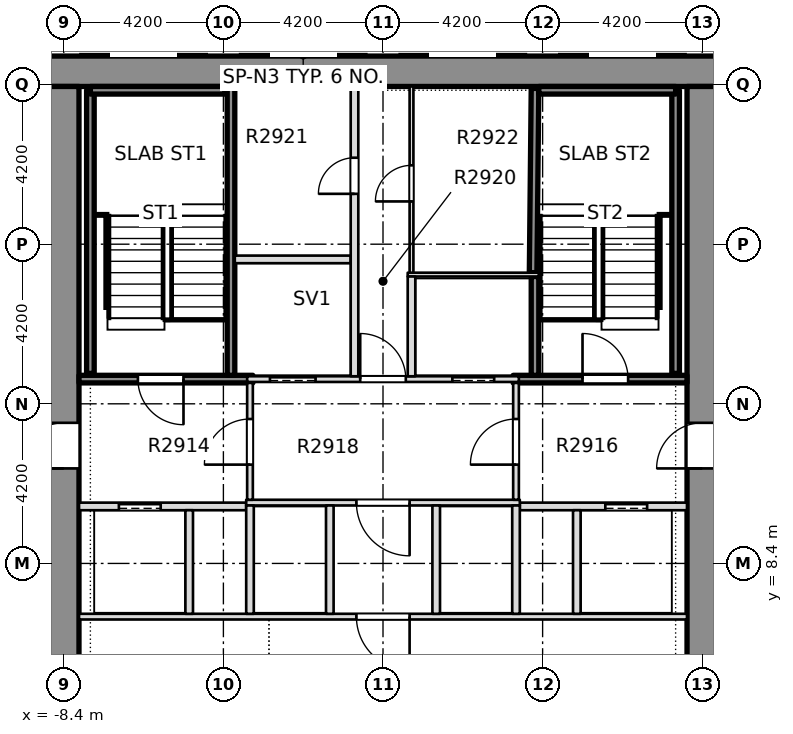
"""IFC4 building model, lengths in metres.
Left out: names, types, materials, properties, quantities, classifications, styles, units other than length and angle.
Written with IfcOpenShell. Run it as: python <this file> out.ifc"""

import sys

from ifc_helpers import new_model, si_unit, direction, frame, frame_2d, origin, place, context, subcontext, project, spatial, rectangle, extrude, element, fill, save


model = new_model("IFC4")
c1 = context("Model", 3, precision=1e-05, world=origin(), true_north=direction((0.0, 1.0)))
c2 = subcontext(c1, "Body", "Model", "MODEL_VIEW")
j1 = project(units=[si_unit("LENGTHUNIT", "METRE"), si_unit("PLANEANGLEUNIT", "RADIAN")], contexts=[c1])
p1 = place(None, origin())
s1 = spatial("IfcSite", under=j1, at=p1, CompositionType="ELEMENT")
p2 = place(p1, origin())
s2 = spatial("IfcBuilding", under=s1, at=p2, CompositionType="ELEMENT")
p3 = place(p2, frame((0.0, 0.0, 114.9)))
s3 = spatial("IfcBuildingStorey", under=s2, at=p3, CompositionType="ELEMENT", Elevation=114.9)
p4 = place(p3, frame((-11.8, 21.35, -0.32), z_axis=(0.0, 0.0, 1.0), x_axis=(1.0, 0.0, 0.0)))
e1 = element("IfcWall", 1, at=p4, inside=s3, PredefinedType="SHEAR", context=c2, shape_type="SweptSolid", body=[
    extrude(rectangle(XDim=23.6, YDim=0.8, at=frame_2d((11.8, 0.0))), origin(), (0.0, 0.0, 1.0), 3.45),
])
p5 = place(p3, frame((-8.4, -7.6, -0.32), z_axis=(0.0, 0.0, 1.0), x_axis=(0.0, 1.0, 0.0)))
e2 = element("IfcWall", 2, at=p5, inside=s3, PredefinedType="SHEAR", context=c2, shape_type="SweptSolid", body=[
    extrude(rectangle(XDim=28.55, YDim=0.8, at=frame_2d((14.275, 0.0))), origin(), (0.0, 0.0, 1.0), 3.45),
])
p6 = place(p5, frame((18.5, 0.0, 0.32)))
e3 = element("IfcOpeningElement", 3, at=p6, cuts=e2, PredefinedType="OPENING", context=c2, shape_type="SweptSolid", body=[
    extrude(rectangle(XDim=1.2, YDim=2.1, at=frame_2d((0.6, 1.05))), frame((0.0, 0.41, 0.0), z_axis=(0.0, -1.0, 0.0), x_axis=(1.0, 0.0, 0.0)), (0.0, 0.0, 1.0), 0.82),
])
p7 = place(p3, frame((8.4, -7.6, -0.32), z_axis=(0.0, 0.0, 1.0), x_axis=(0.0, 1.0, 0.0)))
e4 = element("IfcWall", 4, at=p7, inside=s3, PredefinedType="SHEAR", context=c2, shape_type="SweptSolid", body=[
    extrude(rectangle(XDim=28.55, YDim=0.8, at=frame_2d((14.275, 0.0))), origin(), (0.0, 0.0, 1.0), 3.45),
])
p8 = place(p7, frame((18.5, 0.0, 0.32)))
e5 = element("IfcOpeningElement", 5, at=p8, cuts=e4, PredefinedType="OPENING", context=c2, shape_type="SweptSolid", body=[
    extrude(rectangle(XDim=1.2, YDim=2.1, at=frame_2d((0.6, 1.05))), frame((0.0, 0.41, 0.0), z_axis=(0.0, -1.0, 0.0), x_axis=(1.0, 0.0, 0.0)), (0.0, 0.0, 1.0), 0.82),
])
p9 = place(p3, frame((-7.999, 7.0, 0.0), z_axis=(0.0, 0.0, 1.0), x_axis=(1.0, 0.0, 0.0)))
e6 = element("IfcWall", 6, at=p9, inside=s3, PredefinedType="PARTITIONING", context=c2, shape_type="SweptSolid", body=[
    extrude(rectangle(XDim=15.998, YDim=0.15, at=frame_2d((7.999, 0.0))), origin(), (0.0, 0.0, 1.0), 3.13),
])
p10 = place(p9, frame((7.299, 0.0, 0.0)))
e7 = element("IfcOpeningElement", 7, at=p10, cuts=e6, PredefinedType="OPENING", context=c2, shape_type="SweptSolid", body=[
    extrude(rectangle(XDim=1.4, YDim=2.1, at=frame_2d((0.7, 1.05))), frame((0.0, 0.085, 0.0), z_axis=(0.0, -1.0, 0.0), x_axis=(1.0, 0.0, 0.0)), (0.0, 0.0, 1.0), 0.17),
])
p11 = place(p3, frame((-7.999, 9.9, 0.0), z_axis=(0.0, 0.0, 1.0), x_axis=(1.0, 0.0, 0.0)))
e8 = element("IfcWall", 8, at=p11, inside=s3, PredefinedType="PARTITIONING", context=c2, shape_type="SweptSolid", body=[
    extrude(rectangle(XDim=4.399, YDim=0.2, at=frame_2d((2.199, 0.0))), origin(), (0.0, 0.0, 1.0), 3.13),
])
p12 = place(p11, frame((1.049, 0.0, 0.0)))
e9 = element("IfcOpeningElement", 9, at=p12, cuts=e8, PredefinedType="OPENING", context=c2, shape_type="SweptSolid", body=[
    extrude(rectangle(XDim=1.1, YDim=2.1, at=frame_2d((0.55, 1.05))), frame((0.0, 0.11, 0.0), z_axis=(0.0, -1.0, 0.0), x_axis=(1.0, 0.0, 0.0)), (0.0, 0.0, 1.0), 0.22),
])
p13 = place(p3, frame((3.6, 9.9, 0.0), z_axis=(0.0, 0.0, 1.0), x_axis=(1.0, 0.0, 0.0)))
e10 = element("IfcWall", 10, at=p13, inside=s3, PredefinedType="PARTITIONING", context=c2, shape_type="SweptSolid", body=[
    extrude(rectangle(XDim=4.399, YDim=0.2, at=frame_2d((2.199, 0.0))), origin(), (0.0, 0.0, 1.0), 3.13),
])
p14 = place(p13, frame((2.25, 0.0, 0.0)))
e11 = element("IfcOpeningElement", 11, at=p14, cuts=e10, PredefinedType="OPENING", context=c2, shape_type="SweptSolid", body=[
    extrude(rectangle(XDim=1.1, YDim=2.1, at=frame_2d((0.55, 1.05))), frame((0.0, 0.11, 0.0), z_axis=(0.0, -1.0, 0.0), x_axis=(1.0, 0.0, 0.0)), (0.0, 0.0, 1.0), 0.22),
])
p15 = place(p3, frame((-3.6, 10.0, 0.0), z_axis=(0.0, 0.0, 1.0), x_axis=(1.0, 0.0, 0.0)))
e12 = element("IfcWall", 12, at=p15, inside=s3, PredefinedType="PARTITIONING", context=c2, shape_type="SweptSolid", body=[
    extrude(rectangle(XDim=7.2, YDim=0.15, at=frame_2d((3.6, 0.0))), origin(), (0.0, 0.0, 1.0), 3.13),
])
p16 = place(p15, frame((2.9, 0.0, 0.0)))
e13 = element("IfcOpeningElement", 13, at=p16, cuts=e12, PredefinedType="OPENING", context=c2, shape_type="SweptSolid", body=[
    extrude(rectangle(XDim=1.4, YDim=2.1, at=frame_2d((0.7, 1.05))), frame((0.0, 0.085, 0.0), z_axis=(0.0, -1.0, 0.0), x_axis=(1.0, 0.0, 0.0)), (0.0, 0.0, 1.0), 0.17),
])
p17 = place(p3, frame((-7.999, 13.25, 0.0), z_axis=(0.0, 0.0, 1.0), x_axis=(1.0, 0.0, 0.0)))
e14 = element("IfcWall", 14, at=p17, inside=s3, PredefinedType="SOLIDWALL", context=c2, shape_type="SweptSolid", body=[
    extrude(rectangle(XDim=4.574, YDim=0.2, at=frame_2d((2.287, 0.0))), origin(), (0.0, 0.0, 1.0), 3.13),
])
p18 = place(p17, frame((1.549, 0.0, 0.0)))
e15 = element("IfcOpeningElement", 15, at=p18, cuts=e14, PredefinedType="OPENING", context=c2, shape_type="SweptSolid", body=[
    extrude(rectangle(XDim=1.2, YDim=2.1, at=frame_2d((0.6, 1.05))), frame((0.0, 0.11, 0.0), z_axis=(0.0, -1.0, 0.0), x_axis=(1.0, 0.0, 0.0)), (0.0, 0.0, 1.0), 0.22),
])
p19 = place(p3, frame((-3.575, 13.25, 0.0), z_axis=(0.0, 0.0, 1.0), x_axis=(1.0, 0.0, 0.0)))
e16 = element("IfcWall", 16, at=p19, inside=s3, PredefinedType="PARTITIONING", context=c2, shape_type="SweptSolid", body=[
    extrude(rectangle(XDim=7.15, YDim=0.15, at=frame_2d((3.575, 0.0))), origin(), (0.0, 0.0, 1.0), 3.13),
])
p20 = place(p19, frame((0.6, 0.0, 0.0)))
e17 = element("IfcOpeningElement", 17, at=p20, cuts=e16, PredefinedType="OPENING", context=c2, shape_type="SweptSolid", body=[
    extrude(rectangle(XDim=1.2, YDim=2.1, at=frame_2d((0.6, 1.05))), frame((0.0, 0.085, 0.0), z_axis=(0.0, -1.0, 0.0), x_axis=(1.0, 0.0, 0.0)), (0.0, 0.0, 1.0), 0.17),
])
p21 = place(p19, frame((5.4, 0.0, 0.0)))
e18 = element("IfcOpeningElement", 18, at=p21, cuts=e16, PredefinedType="OPENING", context=c2, shape_type="SweptSolid", body=[
    extrude(rectangle(XDim=1.1, YDim=2.1, at=frame_2d((0.55, 1.05))), frame((0.0, 0.085, 0.0), z_axis=(0.0, -1.0, 0.0), x_axis=(1.0, 0.0, 0.0)), (0.0, 0.0, 1.0), 0.17),
])
p22 = place(p19, frame((2.975, 0.0, 0.0)))
e19 = element("IfcOpeningElement", 19, at=p22, cuts=e16, PredefinedType="OPENING", context=c2, shape_type="SweptSolid", body=[
    extrude(rectangle(XDim=1.2, YDim=2.1, at=frame_2d((0.6, 1.05))), frame((0.0, 0.085, 0.0), z_axis=(0.0, -1.0, 0.0), x_axis=(1.0, 0.0, 0.0)), (0.0, 0.0, 1.0), 0.17),
])
p23 = place(p3, frame((3.425, 13.25, 0.0), z_axis=(0.0, 0.0, 1.0), x_axis=(1.0, 0.0, 0.0)))
e20 = element("IfcWall", 20, at=p23, inside=s3, PredefinedType="SOLIDWALL", context=c2, shape_type="SweptSolid", body=[
    extrude(rectangle(XDim=4.574, YDim=0.2, at=frame_2d((2.287, 0.0))), origin(), (0.0, 0.0, 1.0), 3.13),
])
p24 = place(p23, frame((1.825, 0.0, 0.0)))
e21 = element("IfcOpeningElement", 21, at=p24, cuts=e20, PredefinedType="OPENING", context=c2, shape_type="SweptSolid", body=[
    extrude(rectangle(XDim=1.2, YDim=2.1, at=frame_2d((0.6, 1.05))), frame((0.0, 0.11, 0.0), z_axis=(0.0, -1.0, 0.0), x_axis=(1.0, 0.0, 0.0)), (0.0, 0.0, 1.0), 0.22),
])
p25 = place(p3, frame((0.65, 16.0, 0.0), z_axis=(0.0, 0.0, 1.0), x_axis=(1.0, 0.0, 0.0)))
e22 = element("IfcWall", 22, at=p25, inside=s3, PredefinedType="PARTITIONING", context=c2, shape_type="SweptSolid", body=[
    extrude(rectangle(XDim=3.45, YDim=0.1, at=frame_2d((1.725, 0.0))), origin(), (0.0, 0.0, 1.0), 3.13),
])
p26 = place(p3, frame((-3.9, 16.4, 0.0), z_axis=(0.0, 0.0, 1.0), x_axis=(1.0, 0.0, 0.0)))
e23 = element("IfcWall", 23, at=p26, inside=s3, PredefinedType="PARTITIONING", context=c2, shape_type="SweptSolid", body=[
    extrude(rectangle(XDim=3.05, YDim=0.2, at=frame_2d((1.525, 0.0))), origin(), (0.0, 0.0, 1.0), 3.13),
])
p27 = place(p3, frame((-5.1, 7.075, 0.0), z_axis=(0.0, 0.0, 1.0), x_axis=(0.0, 1.0, 0.0)))
e24 = element("IfcWall", 24, at=p27, inside=s3, PredefinedType="PARTITIONING", context=c2, shape_type="SweptSolid", body=[
    extrude(rectangle(XDim=2.725, YDim=0.2, at=frame_2d((1.363, 0.0))), origin(), (0.0, 0.0, 1.0), 3.13),
])
p28 = place(p3, frame((-4.0, 13.35, 0.0), z_axis=(0.0, 0.0, 1.0), x_axis=(0.0, 1.0, 0.0)))
e25 = element("IfcWall", 25, at=p28, inside=s3, PredefinedType="SOLIDWALL", context=c2, shape_type="SweptSolid", body=[
    extrude(rectangle(XDim=7.599, YDim=0.2, at=frame_2d((3.799, 0.0))), origin(), (0.0, 0.0, 1.0), 3.13),
])
p29 = place(p3, frame((-3.5, 7.075, 0.0), z_axis=(0.0, 0.0, 1.0), x_axis=(0.0, 1.0, 0.0)))
e26 = element("IfcWall", 26, at=p29, inside=s3, PredefinedType="PARTITIONING", context=c2, shape_type="SweptSolid", body=[
    extrude(rectangle(XDim=2.85, YDim=0.2, at=frame_2d((1.425, 0.0))), origin(), (0.0, 0.0, 1.0), 3.13),
])
p30 = place(p3, frame((-3.5, 10.075, 0.0), z_axis=(0.0, 0.0, 1.0), x_axis=(0.0, 1.0, 0.0)))
e27 = element("IfcWall", 27, at=p30, inside=s3, PredefinedType="PARTITIONING", context=c2, shape_type="SweptSolid", body=[
    extrude(rectangle(XDim=3.075, YDim=0.15, at=frame_2d((1.538, 0.0))), origin(), (0.0, 0.0, 1.0), 3.13),
])
p31 = place(p30, frame((0.925, 0.0, 0.0)))
e28 = element("IfcOpeningElement", 28, at=p31, cuts=e27, PredefinedType="OPENING", context=c2, shape_type="SweptSolid", body=[
    extrude(rectangle(XDim=1.2, YDim=2.1, at=frame_2d((0.6, 1.05))), frame((0.0, 0.085, 0.0), z_axis=(0.0, -1.0, 0.0), x_axis=(1.0, 0.0, 0.0)), (0.0, 0.0, 1.0), 0.17),
])
p32 = place(p3, frame((-1.4, 7.075, 0.0), z_axis=(0.0, 0.0, 1.0), x_axis=(0.0, 1.0, 0.0)))
e29 = element("IfcWall", 29, at=p32, inside=s3, PredefinedType="PARTITIONING", context=c2, shape_type="SweptSolid", body=[
    extrude(rectangle(XDim=2.85, YDim=0.2, at=frame_2d((1.425, 0.0))), origin(), (0.0, 0.0, 1.0), 3.13),
])
p33 = place(p3, frame((-0.75, 13.325, 0.0), z_axis=(0.0, 0.0, 1.0), x_axis=(0.0, 1.0, 0.0)))
e30 = element("IfcWall", 30, at=p33, inside=s3, PredefinedType="PARTITIONING", context=c2, shape_type="SweptSolid", body=[
    extrude(rectangle(XDim=7.624, YDim=0.2, at=frame_2d((3.812, 0.0))), origin(), (0.0, 0.0, 1.0), 3.13),
])
p34 = place(p33, frame((4.8, 0.0, 0.0)))
e31 = element("IfcOpeningElement", 31, at=p34, cuts=e30, PredefinedType="OPENING", context=c2, shape_type="SweptSolid", body=[
    extrude(rectangle(XDim=0.95, YDim=2.1, at=frame_2d((0.475, 1.05))), frame((0.0, 0.11, 0.0), z_axis=(0.0, -1.0, 0.0), x_axis=(1.0, 0.0, 0.0)), (0.0, 0.0, 1.0), 0.22),
])
p35 = place(p3, frame((0.75, 13.325, 0.0), z_axis=(0.0, 0.0, 1.0), x_axis=(0.0, 1.0, 0.0)))
e32 = element("IfcWall", 32, at=p35, inside=s3, PredefinedType="PARTITIONING", context=c2, shape_type="SweptSolid", body=[
    extrude(rectangle(XDim=2.625, YDim=0.2, at=frame_2d((1.312, 0.0))), origin(), (0.0, 0.0, 1.0), 3.13),
])
p36 = place(p3, frame((0.75, 16.05, 0.0), z_axis=(0.0, 0.0, 1.0), x_axis=(0.0, 1.0, 0.0)))
e33 = element("IfcWall", 33, at=p36, inside=s3, PredefinedType="PARTITIONING", context=c2, shape_type="SweptSolid", body=[
    extrude(rectangle(XDim=4.899, YDim=0.1, at=frame_2d((2.449, 0.0))), origin(), (0.0, 0.0, 1.0), 3.13),
])
p37 = place(p36, frame((1.875, 0.0, 0.0)))
e34 = element("IfcOpeningElement", 34, at=p37, cuts=e33, PredefinedType="OPENING", context=c2, shape_type="SweptSolid", body=[
    extrude(rectangle(XDim=0.95, YDim=2.1, at=frame_2d((0.475, 1.05))), frame((0.0, 0.06, 0.0), z_axis=(0.0, -1.0, 0.0), x_axis=(1.0, 0.0, 0.0)), (0.0, 0.0, 1.0), 0.12),
])
for number, where, z_axis, x_axis in (
    (35, (1.4, 7.075, 0.0), (0.0, 0.0, 1.0), (0.0, 1.0, 0.0)),
    (36, (3.5, 7.075, 0.0), (0.0, 0.0, 1.0), (0.0, 1.0, 0.0)),
):
    element("IfcWall", number, at=place(p3, frame(where, z_axis=z_axis, x_axis=x_axis)), inside=s3, PredefinedType="PARTITIONING", context=c2, shape_type="SweptSolid", body=[
        extrude(rectangle(XDim=2.85, YDim=0.2, at=frame_2d((1.425, 0.0))), origin(), (0.0, 0.0, 1.0), 3.13),
    ])
p38 = place(p3, frame((3.5, 10.075, 0.0), z_axis=(0.0, 0.0, 1.0), x_axis=(0.0, 1.0, 0.0)))
e37 = element("IfcWall", 37, at=p38, inside=s3, PredefinedType="PARTITIONING", context=c2, shape_type="SweptSolid", body=[
    extrude(rectangle(XDim=3.075, YDim=0.15, at=frame_2d((1.538, 0.0))), origin(), (0.0, 0.0, 1.0), 3.13),
])
p39 = place(p38, frame((0.925, 0.0, 0.0)))
e38 = element("IfcOpeningElement", 38, at=p39, cuts=e37, PredefinedType="OPENING", context=c2, shape_type="SweptSolid", body=[
    extrude(rectangle(XDim=1.2, YDim=2.1, at=frame_2d((0.6, 1.05))), frame((0.0, 0.085, 0.0), z_axis=(0.0, -1.0, 0.0), x_axis=(1.0, 0.0, 0.0)), (0.0, 0.0, 1.0), 0.17),
])
p40 = place(p3, frame((4.0, 13.35, 0.0), z_axis=(0.0, 0.0, 1.0), x_axis=(0.0, 1.0, 0.0)))
e39 = element("IfcWall", 39, at=p40, inside=s3, PredefinedType="SOLIDWALL", context=c2, shape_type="SweptSolid", body=[
    extrude(rectangle(XDim=2.6, YDim=0.2, at=frame_2d((1.3, 0.0))), origin(), (0.0, 0.0, 1.0), 3.13),
])
p41 = place(p3, frame((3.95, 16.05, 0.0), z_axis=(0.0, 0.0, 1.0), x_axis=(0.01032118628, 0.999946735138, 0.0)))
e40 = element("IfcWall", 40, at=p41, inside=s3, PredefinedType="SOLIDWALL", context=c2, shape_type="SweptSolid", body=[
    extrude(rectangle(XDim=4.849, YDim=0.2, at=frame_2d((2.425, 0.0))), origin(), (0.0, 0.0, 1.0), 3.13),
])
p42 = place(p3, frame((5.1, 7.075, 0.0), z_axis=(0.0, 0.0, 1.0), x_axis=(0.0, 1.0, 0.0)))
e41 = element("IfcWall", 41, at=p42, inside=s3, PredefinedType="PARTITIONING", context=c2, shape_type="SweptSolid", body=[
    extrude(rectangle(XDim=2.725, YDim=0.2, at=frame_2d((1.363, 0.0))), origin(), (0.0, 0.0, 1.0), 3.13),
])
p43 = place(p3, frame((-7.7, 13.4, 0.0), z_axis=(0.0, 0.0, 1.0), x_axis=(0.0, 1.0, 0.0)))
e42 = element("IfcWall", 42, at=p43, inside=s3, PredefinedType="SOLIDWALL", context=c2, shape_type="SweptSolid", body=[
    extrude(rectangle(XDim=7.45, YDim=0.2, at=frame_2d((3.725, 0.0))), origin(), (0.0, 0.0, 1.0), 3.13),
])
p44 = place(p3, frame((-7.7, 20.85, 0.0), z_axis=(0.0, 0.0, 1.0), x_axis=(1.0, 0.0, 0.0)))
e43 = element("IfcWall", 43, at=p44, inside=s3, PredefinedType="SOLIDWALL", context=c2, shape_type="SweptSolid", body=[
    extrude(rectangle(XDim=3.55, YDim=0.2, at=frame_2d((1.775, 0.0))), origin(), (0.0, 0.0, 1.0), 3.13),
])
p45 = place(p3, frame((7.7, 13.4, 0.0), z_axis=(0.0, 0.0, 1.0), x_axis=(0.0, 1.0, 0.0)))
e44 = element("IfcWall", 44, at=p45, inside=s3, PredefinedType="SOLIDWALL", context=c2, shape_type="SweptSolid", body=[
    extrude(rectangle(XDim=7.45, YDim=0.2, at=frame_2d((3.725, 0.0))), origin(), (0.0, 0.0, 1.0), 3.13),
])
p46 = place(p3, frame((4.1, 20.85, 0.0), z_axis=(0.0, 0.0, 1.0), x_axis=(1.0, 0.0, 0.0)))
e45 = element("IfcWall", 45, at=p46, inside=s3, PredefinedType="SOLIDWALL", context=c2, shape_type="SweptSolid", body=[
    extrude(rectangle(XDim=3.6, YDim=0.2, at=frame_2d((1.8, 0.0))), origin(), (0.0, 0.0, 1.0), 3.13),
])
p47 = place(p18, origin())
e46 = element("IfcDoor", 46, at=p47, inside=s3, OperationType="SINGLE_SWING_LEFT", PredefinedType="DOOR", context=c2, shape_type="SweptSolid", body=[
    extrude(rectangle(XDim=1.2, YDim=2.1, at=frame_2d((0.6, 1.05))), frame((0.0, 0.025, 0.0), z_axis=(0.0, -1.0, 0.0), x_axis=(1.0, 0.0, 0.0)), (0.0, 0.0, 1.0), 0.05),
])
fill(e15, e46)
p48 = place(p12, origin())
e47 = element("IfcDoor", 47, at=p48, inside=s3, OperationType="SLIDING_TO_LEFT", PredefinedType="DOOR", context=c2, shape_type="SweptSolid", body=[
    extrude(rectangle(XDim=1.1, YDim=2.1, at=frame_2d((0.55, 1.05))), frame((0.0, 0.025, 0.0), z_axis=(0.0, -1.0, 0.0), x_axis=(1.0, 0.0, 0.0)), (0.0, 0.0, 1.0), 0.05),
])
fill(e9, e47)
p49 = place(p24, origin())
e48 = element("IfcDoor", 48, at=p49, inside=s3, OperationType="SINGLE_SWING_RIGHT", PredefinedType="DOOR", context=c2, shape_type="SweptSolid", body=[
    extrude(rectangle(XDim=1.2, YDim=2.1, at=frame_2d((0.6, 1.05))), frame((0.0, 0.025, 0.0), z_axis=(0.0, -1.0, 0.0), x_axis=(1.0, 0.0, 0.0)), (0.0, 0.0, 1.0), 0.05),
])
fill(e21, e48)
p50 = place(p14, origin())
e49 = element("IfcDoor", 49, at=p50, inside=s3, OperationType="SLIDING_TO_LEFT", PredefinedType="DOOR", context=c2, shape_type="SweptSolid", body=[
    extrude(rectangle(XDim=1.1, YDim=2.1, at=frame_2d((0.55, 1.05))), frame((0.0, 0.025, 0.0), z_axis=(0.0, -1.0, 0.0), x_axis=(1.0, 0.0, 0.0)), (0.0, 0.0, 1.0), 0.05),
])
fill(e11, e49)
p51 = place(p10, origin())
e50 = element("IfcDoor", 50, at=p51, inside=s3, OperationType="SINGLE_SWING_RIGHT", PredefinedType="DOOR", context=c2, shape_type="SweptSolid", body=[
    extrude(rectangle(XDim=1.4, YDim=2.1, at=frame_2d((0.7, 1.05))), frame((0.0, 0.025, 0.0), z_axis=(0.0, -1.0, 0.0), x_axis=(1.0, 0.0, 0.0)), (0.0, 0.0, 1.0), 0.05),
])
fill(e7, e50)
p52 = place(p16, origin())
e51 = element("IfcDoor", 51, at=p52, inside=s3, OperationType="SINGLE_SWING_RIGHT", PredefinedType="DOOR", context=c2, shape_type="SweptSolid", body=[
    extrude(rectangle(XDim=1.4, YDim=2.1, at=frame_2d((0.7, 1.05))), frame((0.0, 0.025, 0.0), z_axis=(0.0, -1.0, 0.0), x_axis=(1.0, 0.0, 0.0)), (0.0, 0.0, 1.0), 0.05),
])
fill(e13, e51)
p53 = place(p20, origin())
e52 = element("IfcDoor", 52, at=p53, inside=s3, OperationType="SLIDING_TO_RIGHT", PredefinedType="DOOR", context=c2, shape_type="SweptSolid", body=[
    extrude(rectangle(XDim=1.2, YDim=2.1, at=frame_2d((0.6, 1.05))), frame((0.0, 0.025, 0.0), z_axis=(0.0, -1.0, 0.0), x_axis=(1.0, 0.0, 0.0)), (0.0, 0.0, 1.0), 0.05),
])
fill(e17, e52)
p54 = place(p21, origin())
e53 = element("IfcDoor", 53, at=p54, inside=s3, OperationType="SLIDING_TO_LEFT", PredefinedType="DOOR", context=c2, shape_type="SweptSolid", body=[
    extrude(rectangle(XDim=1.1, YDim=2.1, at=frame_2d((0.55, 1.05))), frame((0.0, 0.025, 0.0), z_axis=(0.0, -1.0, 0.0), x_axis=(1.0, 0.0, 0.0)), (0.0, 0.0, 1.0), 0.05),
])
fill(e18, e53)
p55 = place(p22, origin())
e54 = element("IfcDoor", 54, at=p55, inside=s3, OperationType="SINGLE_SWING_RIGHT", PredefinedType="DOOR", context=c2, shape_type="SweptSolid", body=[
    extrude(rectangle(XDim=1.2, YDim=2.1, at=frame_2d((0.6, 1.05))), frame((0.0, 0.025, 0.0), z_axis=(0.0, -1.0, 0.0), x_axis=(1.0, 0.0, 0.0)), (0.0, 0.0, 1.0), 0.05),
])
fill(e19, e54)
p56 = place(p34, origin())
e55 = element("IfcDoor", 55, at=p56, inside=s3, OperationType="SINGLE_SWING_RIGHT", PredefinedType="DOOR", context=c2, shape_type="SweptSolid", body=[
    extrude(rectangle(XDim=0.95, YDim=2.1, at=frame_2d((0.475, 1.05))), frame((0.0, 0.025, 0.0), z_axis=(0.0, -1.0, 0.0), x_axis=(1.0, 0.0, 0.0)), (0.0, 0.0, 1.0), 0.05),
])
fill(e31, e55)
p57 = place(p37, origin())
e56 = element("IfcDoor", 56, at=p57, inside=s3, OperationType="SINGLE_SWING_LEFT", PredefinedType="DOOR", context=c2, shape_type="SweptSolid", body=[
    extrude(rectangle(XDim=0.95, YDim=2.1, at=frame_2d((0.475, 1.05))), frame((0.0, 0.025, 0.0), z_axis=(0.0, -1.0, 0.0), x_axis=(1.0, 0.0, 0.0)), (0.0, 0.0, 1.0), 0.05),
])
fill(e34, e56)
p58 = place(p31, origin())
e57 = element("IfcDoor", 57, at=p58, inside=s3, OperationType="SINGLE_SWING_RIGHT", PredefinedType="DOOR", context=c2, shape_type="SweptSolid", body=[
    extrude(rectangle(XDim=1.2, YDim=2.1, at=frame_2d((0.6, 1.05))), frame((0.0, 0.025, 0.0), z_axis=(0.0, -1.0, 0.0), x_axis=(1.0, 0.0, 0.0)), (0.0, 0.0, 1.0), 0.05),
])
fill(e28, e57)
p59 = place(p39, origin())
e58 = element("IfcDoor", 58, at=p59, inside=s3, OperationType="SINGLE_SWING_LEFT", PredefinedType="DOOR", context=c2, shape_type="SweptSolid", body=[
    extrude(rectangle(XDim=1.2, YDim=2.1, at=frame_2d((0.6, 1.05))), frame((0.0, 0.025, 0.0), z_axis=(0.0, -1.0, 0.0), x_axis=(1.0, 0.0, 0.0)), (0.0, 0.0, 1.0), 0.05),
])
fill(e38, e58)
p60 = place(p6, origin())
e59 = element("IfcDoor", 59, at=p60, inside=s3, OperationType="SINGLE_SWING_LEFT", PredefinedType="DOOR", context=c2, shape_type="SweptSolid", body=[
    extrude(rectangle(XDim=1.2, YDim=2.1, at=frame_2d((0.6, 1.05))), frame((0.0, 0.025, 0.0), z_axis=(0.0, -1.0, 0.0), x_axis=(1.0, 0.0, 0.0)), (0.0, 0.0, 1.0), 0.05),
])
fill(e3, e59)
p61 = place(p8, origin())
e60 = element("IfcDoor", 60, at=p61, inside=s3, OperationType="SINGLE_SWING_LEFT", PredefinedType="DOOR", context=c2, shape_type="SweptSolid", body=[
    extrude(rectangle(XDim=1.2, YDim=2.1, at=frame_2d((0.6, 1.05))), frame((0.0, 0.025, 0.0), z_axis=(0.0, -1.0, 0.0), x_axis=(1.0, 0.0, 0.0)), (0.0, 0.0, 1.0), 0.05),
])
fill(e5, e60)
save(model, sys.argv[1])
